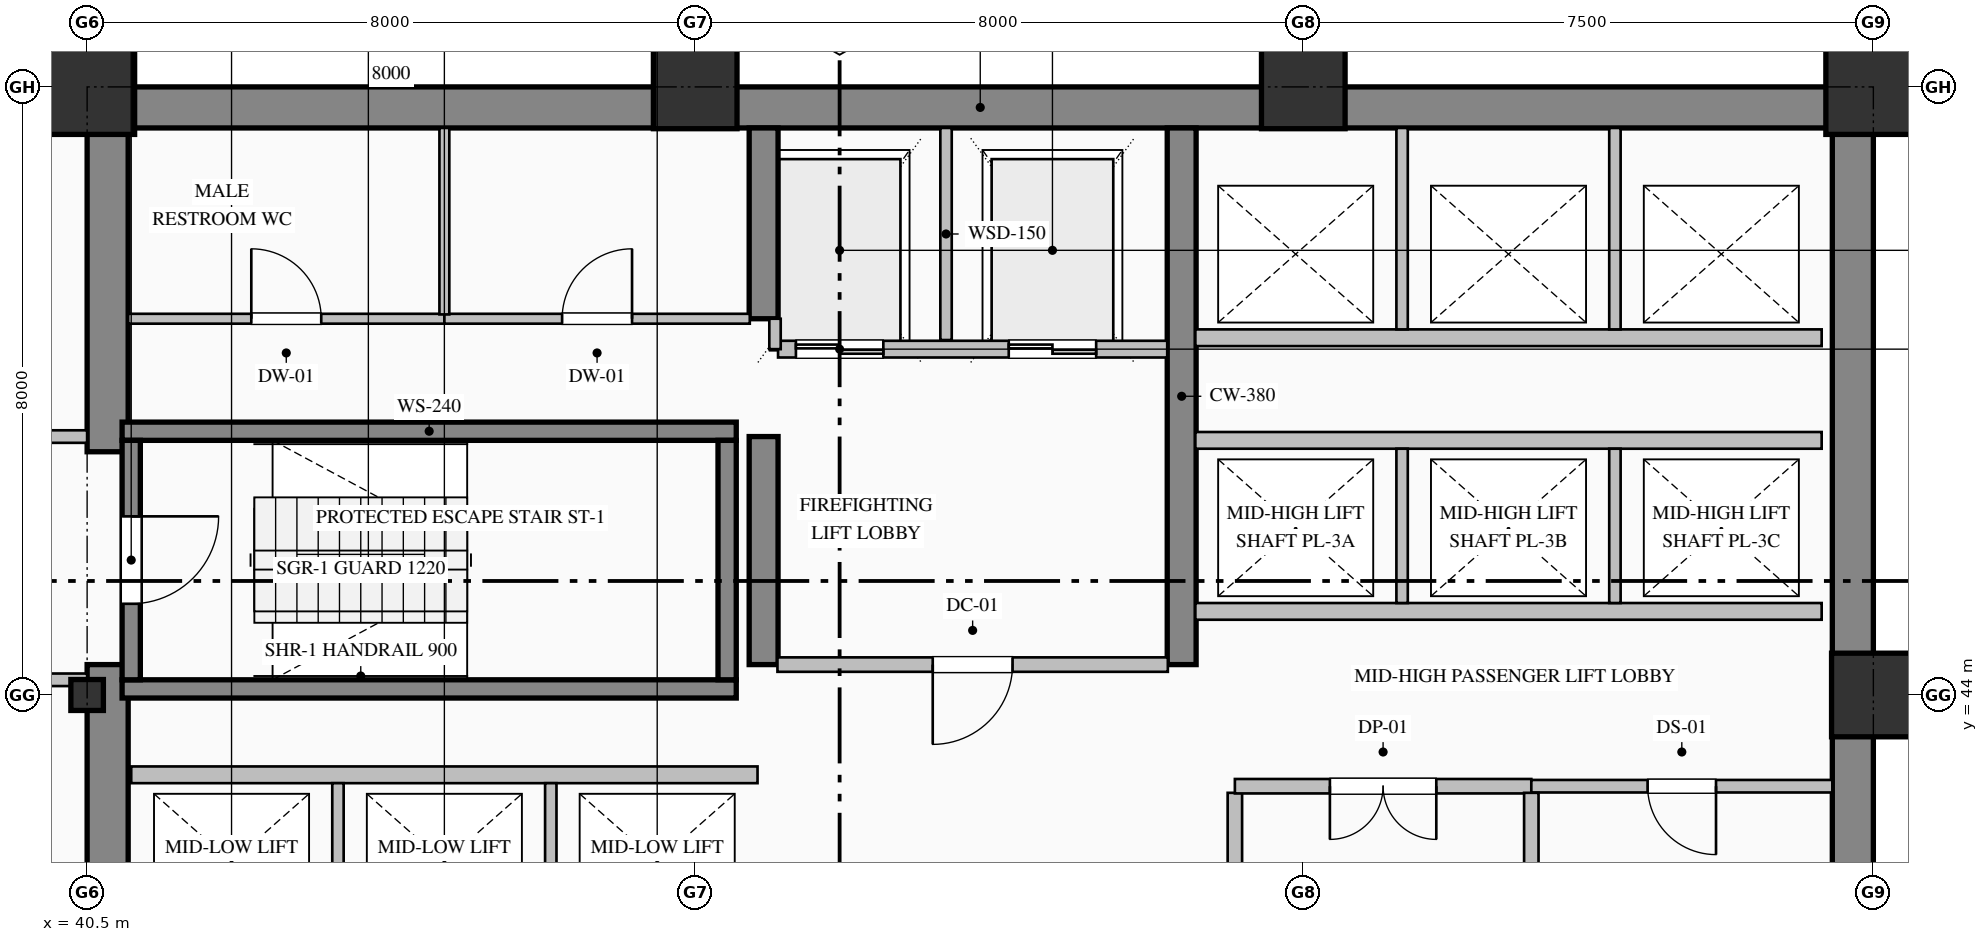
"""IFC4 building model, lengths in metres.
Left out: names, types, materials, properties, quantities, classifications, styles, units other than length and angle.
Written with IfcOpenShell. Run it as: python <this file> out.ifc"""

import sys

from ifc_helpers import new_model, si_unit, direction, frame, frame_2d, origin, origin_2d, place, context, subcontext, project, spatial, rectangle, hollow_rectangle, i_section, extrude, element, fill, save


model = new_model("IFC4")
c1 = context("Model", 3, precision=1e-05, world=origin(), true_north=direction((0.0, 1.0)))
c2 = subcontext(c1, "Body", "Model", "MODEL_VIEW")
j1 = project(units=[si_unit("LENGTHUNIT", "METRE"), si_unit("PLANEANGLEUNIT", "RADIAN")], contexts=[c1])
p1 = place(None, origin())
s1 = spatial("IfcSite", under=j1, at=p1, CompositionType="ELEMENT")
p2 = place(p1, origin())
s2 = spatial("IfcBuilding", under=s1, at=p2, CompositionType="ELEMENT")
p3 = place(p2, frame((0.0, 0.0, 84.2)))
s3 = spatial("IfcBuildingStorey", under=s2, at=p3, CompositionType="ELEMENT", Elevation=84.2)
p4 = place(p3, frame((40.5, 51.73, 0.0), z_axis=(0.0, 0.0, 1.0), x_axis=(1.0, 0.0, 0.0)))
e1 = element("IfcWall", 1, at=p4, inside=s3, PredefinedType="SHEAR", context=c2, shape_type="SweptSolid", body=[
    extrude(rectangle(XDim=23.5, YDim=0.54, at=frame_2d((11.75, 0.0))), origin(), (0.0, 0.0, 1.0), 3.75),
])
p5 = place(p3, frame((63.73, 36.32, 0.0), z_axis=(0.0, 0.0, 1.0), x_axis=(0.0, 1.0, 0.0)))
e2 = element("IfcWall", 2, at=p5, inside=s3, PredefinedType="SHEAR", context=c2, shape_type="SweptSolid", body=[
    extrude(rectangle(XDim=15.14, YDim=0.54, at=frame_2d((7.57, 0.0))), origin(), (0.0, 0.0, 1.0), 3.75),
])
p6 = place(p3, frame((40.77, 36.54, 0.0), z_axis=(0.0, 0.0, 1.0), x_axis=(0.0, 1.0, 0.0)))
e3 = element("IfcWall", 3, at=p6, inside=s3, PredefinedType="SHEAR", context=c2, shape_type="SweptSolid", body=[
    extrude(rectangle(XDim=7.86, YDim=0.54, at=frame_2d((3.93, 0.0))), origin(), (0.0, 0.0, 1.0), 3.75),
])
p7 = place(p3, frame((40.77, 47.2, 0.0), z_axis=(0.0, 0.0, 1.0), x_axis=(0.0, 1.0, 0.0)))
e4 = element("IfcWall", 4, at=p7, inside=s3, PredefinedType="SHEAR", context=c2, shape_type="SweptSolid", body=[
    extrude(rectangle(XDim=4.26, YDim=0.54, at=frame_2d((2.13, 0.0))), origin(), (0.0, 0.0, 1.0), 3.75),
])
p8 = place(p3, frame((49.4, 44.4, 0.0), z_axis=(0.0, 0.0, 1.0), x_axis=(0.0, 1.0, 0.0)))
e5 = element("IfcWall", 5, at=p8, inside=s3, PredefinedType="SHEAR", context=c2, shape_type="SweptSolid", body=[
    extrude(rectangle(XDim=3.0, YDim=0.38, at=frame_2d((1.5, 0.0))), origin(), (0.0, 0.0, 1.0), 3.75),
])
p9 = place(p3, frame((49.4, 48.95, 0.0), z_axis=(0.0, 0.0, 1.0), x_axis=(0.0, 1.0, 0.0)))
e6 = element("IfcWall", 6, at=p9, inside=s3, PredefinedType="SHEAR", context=c2, shape_type="SweptSolid", body=[
    extrude(rectangle(XDim=2.51, YDim=0.38, at=frame_2d((1.255, 0.0))), origin(), (0.0, 0.0, 1.0), 3.75),
])
p10 = place(p3, frame((54.9, 44.4, 0.0), z_axis=(0.0, 0.0, 1.0), x_axis=(0.0, 1.0, 0.0)))
e7 = element("IfcWall", 7, at=p10, inside=s3, PredefinedType="SHEAR", context=c2, shape_type="SweptSolid", body=[
    extrude(rectangle(XDim=7.06, YDim=0.38, at=frame_2d((3.53, 0.0))), origin(), (0.0, 0.0, 1.0), 3.75),
])
p11 = place(p3, frame((40.5, 44.0, 0.0), z_axis=(0.0, 0.0, 1.0), x_axis=(1.0, 0.0, 0.0)))
e8 = element("IfcColumn", 8, at=p11, inside=s3, PredefinedType="COLUMN", context=c2, shape_type="SweptSolid", body=[
    extrude(i_section(OverallWidth=0.407, OverallDepth=0.428, WebThickness=0.02, FlangeThickness=0.035, FilletRadius=0.022, at=origin_2d()), origin(), (0.0, 0.0, 1.0), 4.0),
])
p12 = place(p3, frame((40.5, 52.0, 0.0), z_axis=(0.0, 0.0, 1.0), x_axis=(1.0, 0.0, 0.0)))
e9 = element("IfcColumn", 9, at=p12, inside=s3, PredefinedType="COLUMN", context=c2, shape_type="SweptSolid", body=[
    extrude(hollow_rectangle(XDim=1.25, YDim=1.25, WallThickness=0.045, at=origin_2d()), origin(), (0.0, 0.0, 1.0), 4.0),
])
for number, where, z_axis, x_axis in (
    (10, (48.5, 52.0, 0.0), (0.0, 0.0, 1.0), (1.0, 0.0, 0.0)),
    (11, (56.5, 52.0, 0.0), (0.0, 0.0, 1.0), (1.0, 0.0, 0.0)),
    (12, (64.0, 44.0, 0.0), (0.0, 0.0, 1.0), (1.0, 0.0, 0.0)),
):
    element("IfcColumn", number, at=place(p3, frame(where, z_axis=z_axis, x_axis=x_axis)), inside=s3, PredefinedType="COLUMN", context=c2, shape_type="SweptSolid", body=[
        extrude(hollow_rectangle(XDim=1.1, YDim=1.1, WallThickness=0.04, at=origin_2d()), origin(), (0.0, 0.0, 1.0), 4.0),
    ])
p13 = place(p3, frame((64.0, 52.0, 0.0), z_axis=(0.0, 0.0, 1.0), x_axis=(1.0, 0.0, 0.0)))
e13 = element("IfcColumn", 13, at=p13, inside=s3, PredefinedType="COLUMN", context=c2, shape_type="SweptSolid", body=[
    extrude(hollow_rectangle(XDim=1.25, YDim=1.25, WallThickness=0.045, at=origin_2d()), origin(), (0.0, 0.0, 1.0), 4.0),
])
p14 = place(p3, frame((4.0, 51.82, 0.0), z_axis=(0.0, 0.0, 1.0), x_axis=(1.0, 0.0, 0.0)))
e14 = element("IfcWall", 14, at=p14, inside=s3, PredefinedType="SOLIDWALL", context=c2, shape_type="SweptSolid", body=[
    extrude(rectangle(XDim=36.52, YDim=0.36, at=frame_2d((18.26, 0.0))), origin(), (0.0, 0.0, 1.0), 3.25),
])
p15 = place(p14, frame((6.0, 0.0, 0.8)))
e15 = element("IfcOpeningElement", 15, at=p15, cuts=e14, PredefinedType="OPENING", context=c2, shape_type="SweptSolid", body=[
    extrude(rectangle(XDim=2.4, YDim=2.15, at=frame_2d((1.2, 1.075))), frame((0.0, 0.19, 0.0), z_axis=(0.0, -1.0, 0.0), x_axis=(1.0, 0.0, 0.0)), (0.0, 0.0, 1.0), 0.38),
])
p16 = place(p14, frame((24.15, 0.0, 0.85)))
e16 = element("IfcOpeningElement", 16, at=p16, cuts=e14, PredefinedType="OPENING", context=c2, shape_type="SweptSolid", body=[
    extrude(rectangle(XDim=2.1, YDim=2.05, at=frame_2d((1.05, 1.025))), frame((0.0, 0.19, 0.0), z_axis=(0.0, -1.0, 0.0), x_axis=(1.0, 0.0, 0.0)), (0.0, 0.0, 1.0), 0.38),
])
for number, where, z_axis, x_axis in (
    (17, (40.96, 47.47, 0.0), (0.0, 0.0, 1.0), (1.0, 0.0, 0.0)),
    (18, (49.04, 44.08, 0.0), (0.0, 0.0, 1.0), (-1.0, 0.0, 0.0)),
):
    element("IfcWall", number, at=place(p3, frame(where, z_axis=z_axis, x_axis=x_axis)), inside=s3, PredefinedType="SOLIDWALL", context=c2, shape_type="SweptSolid", body=[
        extrude(rectangle(XDim=8.08, YDim=0.24, at=frame_2d((4.04, 0.0))), origin(), (0.0, 0.0, 1.0), 4.0),
    ])
p17 = place(p3, frame((41.08, 47.35, 0.0), z_axis=(0.0, 0.0, 1.0), x_axis=(0.0, -1.0, 0.0)))
e19 = element("IfcWall", 19, at=p17, inside=s3, PredefinedType="SOLIDWALL", context=c2, shape_type="SweptSolid", body=[
    extrude(rectangle(XDim=3.15, YDim=0.24, at=frame_2d((1.575, 0.0))), origin(), (0.0, 0.0, 1.0), 4.0),
])
p18 = place(p17, frame((1.0, 0.0, 0.0)))
e20 = element("IfcOpeningElement", 20, at=p18, cuts=e19, PredefinedType="OPENING", context=c2, shape_type="SweptSolid", body=[
    extrude(rectangle(XDim=1.15, YDim=2.2, at=frame_2d((0.575, 1.1))), frame((0.0, 0.13, 0.0), z_axis=(0.0, -1.0, 0.0), x_axis=(1.0, 0.0, 0.0)), (0.0, 0.0, 1.0), 0.26),
])
p19 = place(p3, frame((48.92, 44.2, 0.0), z_axis=(0.0, 0.0, 1.0), x_axis=(0.0, 1.0, 0.0)))
e21 = element("IfcWall", 21, at=p19, inside=s3, PredefinedType="SOLIDWALL", context=c2, shape_type="SweptSolid", body=[
    extrude(rectangle(XDim=3.15, YDim=0.24, at=frame_2d((1.575, 0.0))), origin(), (0.0, 0.0, 1.0), 4.0),
])
p20 = place(p3, frame((54.71, 48.55, 0.0), z_axis=(0.0, 0.0, 1.0), x_axis=(-1.0, 0.0, 0.0)))
e22 = element("IfcWall", 22, at=p20, inside=s3, PredefinedType="PARTITIONING", context=c2, shape_type="SweptSolid", body=[
    extrude(rectangle(XDim=5.12, YDim=0.22, at=frame_2d((2.56, 0.0))), origin(), (0.0, 0.0, 1.0), 3.75),
])
p21 = place(p20, frame((3.735, 0.0, 0.0)))
e23 = element("IfcOpeningElement", 23, at=p21, cuts=e22, PredefinedType="OPENING", context=c2, shape_type="SweptSolid", body=[
    extrude(rectangle(XDim=1.15, YDim=2.2, at=frame_2d((0.575, 1.1))), frame((0.0, 0.12, 0.0), z_axis=(0.0, -1.0, 0.0), x_axis=(1.0, 0.0, 0.0)), (0.0, 0.0, 1.0), 0.24),
])
p22 = place(p20, frame((0.935, 0.0, 0.0)))
e24 = element("IfcOpeningElement", 24, at=p22, cuts=e22, PredefinedType="OPENING", context=c2, shape_type="SweptSolid", body=[
    extrude(rectangle(XDim=1.15, YDim=2.2, at=frame_2d((0.575, 1.1))), frame((0.0, 0.12, 0.0), z_axis=(0.0, -1.0, 0.0), x_axis=(1.0, 0.0, 0.0)), (0.0, 0.0, 1.0), 0.24),
])
p23 = place(p3, frame((51.8, 48.67, 0.0), z_axis=(0.0, 0.0, 1.0), x_axis=(0.0, 1.0, 0.0)))
e25 = element("IfcWall", 25, at=p23, inside=s3, PredefinedType="PARTITIONING", context=c2, shape_type="SweptSolid", body=[
    extrude(rectangle(XDim=2.79, YDim=0.15, at=frame_2d((1.395, 0.0))), origin(), (0.0, 0.0, 1.0), 3.75),
])
p24 = place(p3, frame((49.55, 48.55, 0.0), z_axis=(0.0, 0.0, 1.0), x_axis=(0.0, 1.0, 0.0)))
e26 = element("IfcWall", 26, at=p24, inside=s3, PredefinedType="PARTITIONING", context=c2, shape_type="SweptSolid", body=[
    extrude(rectangle(XDim=0.4, YDim=0.15, at=frame_2d((0.2, 0.0))), origin(), (0.0, 0.0, 1.0), 3.75),
])
p25 = place(p3, frame((41.08, 42.95, 0.0), z_axis=(0.0, 0.0, 1.0), x_axis=(1.0, 0.0, 0.0)))
e27 = element("IfcWall", 27, at=p25, inside=s3, PredefinedType="PARTITIONING", context=c2, shape_type="SweptSolid", body=[
    extrude(rectangle(XDim=8.24, YDim=0.22, at=frame_2d((4.12, 0.0))), origin(), (0.0, 0.0, 1.0), 3.75),
])
for number, where, z_axis, x_axis in (
    (28, (43.8, 40.76, 0.0), (0.0, 0.0, 1.0), (0.0, 1.0, 0.0)),
    (29, (46.6, 40.76, 0.0), (0.0, 0.0, 1.0), (0.0, 1.0, 0.0)),
):
    element("IfcWall", number, at=place(p3, frame(where, z_axis=z_axis, x_axis=x_axis)), inside=s3, PredefinedType="PARTITIONING", context=c2, shape_type="SweptSolid", body=[
        extrude(rectangle(XDim=2.08, YDim=0.15, at=frame_2d((1.04, 0.0))), origin(), (0.0, 0.0, 1.0), 3.75),
    ])
for number, where, z_axis, x_axis in (
    (30, (63.32, 45.1, 0.0), (0.0, 0.0, 1.0), (-1.0, 0.0, 0.0)),
    (31, (55.08, 47.35, 0.0), (0.0, 0.0, 1.0), (1.0, 0.0, 0.0)),
):
    element("IfcWall", number, at=place(p3, frame(where, z_axis=z_axis, x_axis=x_axis)), inside=s3, PredefinedType="PARTITIONING", context=c2, shape_type="SweptSolid", body=[
        extrude(rectangle(XDim=8.24, YDim=0.22, at=frame_2d((4.12, 0.0))), origin(), (0.0, 0.0, 1.0), 3.75),
    ])
for number, where, z_axis, x_axis in (
    (32, (57.8, 45.21, 0.0), (0.0, 0.0, 1.0), (0.0, 1.0, 0.0)),
    (33, (60.6, 45.21, 0.0), (0.0, 0.0, 1.0), (0.0, 1.0, 0.0)),
):
    element("IfcWall", number, at=place(p3, frame(where, z_axis=z_axis, x_axis=x_axis)), inside=s3, PredefinedType="PARTITIONING", context=c2, shape_type="SweptSolid", body=[
        extrude(rectangle(XDim=2.03, YDim=0.15, at=frame_2d((1.015, 0.0))), origin(), (0.0, 0.0, 1.0), 3.75),
    ])
p26 = place(p3, frame((63.32, 48.7, 0.0), z_axis=(0.0, 0.0, 1.0), x_axis=(-1.0, 0.0, 0.0)))
e34 = element("IfcWall", 34, at=p26, inside=s3, PredefinedType="PARTITIONING", context=c2, shape_type="SweptSolid", body=[
    extrude(rectangle(XDim=8.24, YDim=0.22, at=frame_2d((4.12, 0.0))), origin(), (0.0, 0.0, 1.0), 3.75),
])
for number, where, z_axis, x_axis in (
    (35, (57.8, 48.81, 0.0), (0.0, 0.0, 1.0), (0.0, 1.0, 0.0)),
    (36, (60.6, 48.81, 0.0), (0.0, 0.0, 1.0), (0.0, 1.0, 0.0)),
):
    element("IfcWall", number, at=place(p3, frame(where, z_axis=z_axis, x_axis=x_axis)), inside=s3, PredefinedType="PARTITIONING", context=c2, shape_type="SweptSolid", body=[
        extrude(rectangle(XDim=2.65, YDim=0.15, at=frame_2d((1.325, 0.0))), origin(), (0.0, 0.0, 1.0), 3.75),
    ])
p27 = place(p3, frame((37.8, 47.4, 0.0), z_axis=(0.0, 0.0, 1.0), x_axis=(1.0, 0.0, 0.0)))
e37 = element("IfcWall", 37, at=p27, inside=s3, PredefinedType="PARTITIONING", context=c2, shape_type="SweptSolid", body=[
    extrude(rectangle(XDim=2.7, YDim=0.165, at=frame_2d((1.35, 0.0))), origin(), (0.0, 0.0, 1.0), 3.75),
])
p28 = place(p27, frame((0.825, 0.0, 0.0)))
e38 = element("IfcOpeningElement", 38, at=p28, cuts=e37, PredefinedType="OPENING", context=c2, shape_type="SweptSolid", body=[
    extrude(rectangle(XDim=1.05, YDim=2.15, at=frame_2d((0.525, 1.075))), frame((0.0, 0.093, 0.0), z_axis=(0.0, -1.0, 0.0), x_axis=(1.0, 0.0, 0.0)), (0.0, 0.0, 1.0), 0.185),
])
p29 = place(p3, frame((40.5, 44.2, 0.0), z_axis=(0.0, 0.0, 1.0), x_axis=(-1.0, 0.0, 0.0)))
e39 = element("IfcWall", 39, at=p29, inside=s3, PredefinedType="PARTITIONING", context=c2, shape_type="SweptSolid", body=[
    extrude(rectangle(XDim=2.7, YDim=0.165, at=frame_2d((1.35, 0.0))), origin(), (0.0, 0.0, 1.0), 3.75),
])
p30 = place(p29, frame((0.825, 0.0, 0.0)))
e40 = element("IfcOpeningElement", 40, at=p30, cuts=e39, PredefinedType="OPENING", context=c2, shape_type="SweptSolid", body=[
    extrude(rectangle(XDim=1.05, YDim=2.15, at=frame_2d((0.525, 1.075))), frame((0.0, 0.093, 0.0), z_axis=(0.0, -1.0, 0.0), x_axis=(1.0, 0.0, 0.0)), (0.0, 0.0, 1.0), 0.185),
])
p31 = place(p3, frame((41.04, 48.95, 0.0), z_axis=(0.0, 0.0, 1.0), x_axis=(1.0, 0.0, 0.0)))
e41 = element("IfcWall", 41, at=p31, inside=s3, PredefinedType="PARTITIONING", context=c2, shape_type="SweptSolid", body=[
    extrude(rectangle(XDim=4.16, YDim=0.13, at=frame_2d((2.08, 0.0))), origin(), (0.0, 0.0, 1.0), 3.75),
])
p32 = place(p31, frame((1.62, 0.0, 0.0)))
e42 = element("IfcOpeningElement", 42, at=p32, cuts=e41, PredefinedType="OPENING", context=c2, shape_type="SweptSolid", body=[
    extrude(rectangle(XDim=0.92, YDim=2.15, at=frame_2d((0.46, 1.075))), frame((0.0, 0.075, 0.0), z_axis=(0.0, -1.0, 0.0), x_axis=(1.0, 0.0, 0.0)), (0.0, 0.0, 1.0), 0.15),
])
p33 = place(p3, frame((45.2, 48.95, 0.0), z_axis=(0.0, 0.0, 1.0), x_axis=(1.0, 0.0, 0.0)))
e43 = element("IfcWall", 43, at=p33, inside=s3, PredefinedType="PARTITIONING", context=c2, shape_type="SweptSolid", body=[
    extrude(rectangle(XDim=4.018, YDim=0.13, at=frame_2d((2.009, 0.0))), origin(), (0.0, 0.0, 1.0), 3.75),
])
p34 = place(p33, frame((1.549, 0.0, 0.0)))
e44 = element("IfcOpeningElement", 44, at=p34, cuts=e43, PredefinedType="OPENING", context=c2, shape_type="SweptSolid", body=[
    extrude(rectangle(XDim=0.92, YDim=2.15, at=frame_2d((0.46, 1.075))), frame((0.0, 0.075, 0.0), z_axis=(0.0, -1.0, 0.0), x_axis=(1.0, 0.0, 0.0)), (0.0, 0.0, 1.0), 0.15),
])
p35 = place(p3, frame((54.718, 44.4, 0.0), z_axis=(0.0, 0.0, 1.0), x_axis=(-1.0, 0.0, 0.0)))
e45 = element("IfcWall", 45, at=p35, inside=s3, PredefinedType="PARTITIONING", context=c2, shape_type="SweptSolid", body=[
    extrude(rectangle(XDim=5.136, YDim=0.19, at=frame_2d((2.568, 0.0))), origin(), (0.0, 0.0, 1.0), 3.75),
])
p36 = place(p35, frame((2.043, 0.0, 0.0)))
e46 = element("IfcOpeningElement", 46, at=p36, cuts=e45, PredefinedType="OPENING", context=c2, shape_type="SweptSolid", body=[
    extrude(rectangle(XDim=1.05, YDim=2.15, at=frame_2d((0.525, 1.075))), frame((0.0, 0.105, 0.0), z_axis=(0.0, -1.0, 0.0), x_axis=(1.0, 0.0, 0.0)), (0.0, 0.0, 1.0), 0.21),
])
p37 = place(p3, frame((55.6, 42.713, 0.0), z_axis=(0.0, 0.0, 1.0), x_axis=(0.0, -1.0, 0.0)))
e47 = element("IfcWall", 47, at=p37, inside=s3, PredefinedType="PARTITIONING", context=c2, shape_type="SweptSolid", body=[
    extrude(rectangle(XDim=2.731, YDim=0.19, at=frame_2d((1.365, 0.0))), origin(), (0.0, 0.0, 1.0), 3.75),
])
p38 = place(p3, frame((59.5, 42.8, 0.0), z_axis=(0.0, 0.0, 1.0), x_axis=(-1.0, 0.0, 0.0)))
e48 = element("IfcWall", 48, at=p38, inside=s3, PredefinedType="PARTITIONING", context=c2, shape_type="SweptSolid", body=[
    extrude(rectangle(XDim=3.9, YDim=0.19, at=frame_2d((1.95, 0.0))), origin(), (0.0, 0.0, 1.0), 3.75),
])
p39 = place(p38, frame((1.25, 0.0, 0.0)))
e49 = element("IfcOpeningElement", 49, at=p39, cuts=e48, PredefinedType="OPENING", context=c2, shape_type="SweptSolid", body=[
    extrude(rectangle(XDim=1.4, YDim=2.25, at=frame_2d((0.7, 1.125))), frame((0.0, 0.105, 0.0), z_axis=(0.0, -1.0, 0.0), x_axis=(1.0, 0.0, 0.0)), (0.0, 0.0, 1.0), 0.21),
])
p40 = place(p3, frame((63.46, 42.8, 0.0), z_axis=(0.0, 0.0, 1.0), x_axis=(-1.0, 0.0, 0.0)))
e50 = element("IfcWall", 50, at=p40, inside=s3, PredefinedType="PARTITIONING", context=c2, shape_type="SweptSolid", body=[
    extrude(rectangle(XDim=3.96, YDim=0.165, at=frame_2d((1.98, 0.0))), origin(), (0.0, 0.0, 1.0), 3.75),
])
p41 = place(p40, frame((1.53, 0.0, 0.0)))
e51 = element("IfcOpeningElement", 51, at=p41, cuts=e50, PredefinedType="OPENING", context=c2, shape_type="SweptSolid", body=[
    extrude(rectangle(XDim=0.9, YDim=2.15, at=frame_2d((0.45, 1.075))), frame((0.0, 0.093, 0.0), z_axis=(0.0, -1.0, 0.0), x_axis=(1.0, 0.0, 0.0)), (0.0, 0.0, 1.0), 0.185),
])
p42 = place(p3, frame((45.2, 51.46, 0.0), z_axis=(0.0, 0.0, 1.0), x_axis=(0.0, -1.0, 0.0)))
e52 = element("IfcWall", 52, at=p42, inside=s3, PredefinedType="PARTITIONING", context=c2, shape_type="SweptSolid", body=[
    extrude(rectangle(XDim=2.453, YDim=0.13, at=frame_2d((1.227, 0.0))), origin(), (0.0, 0.0, 1.0), 3.75),
])
p43 = place(p3, frame((59.5, 42.713, 0.0), z_axis=(0.0, 0.0, 1.0), x_axis=(0.0, -1.0, 0.0)))
e53 = element("IfcWall", 53, at=p43, inside=s3, PredefinedType="PARTITIONING", context=c2, shape_type="SweptSolid", body=[
    extrude(rectangle(XDim=2.731, YDim=0.19, at=frame_2d((1.365, 0.0))), origin(), (0.0, 0.0, 1.0), 3.75),
])
p44 = place(p18, origin())
e54 = element("IfcDoor", 54, at=p44, inside=s3, OperationType="SINGLE_SWING_LEFT", PredefinedType="DOOR", context=c2, shape_type="SweptSolid", body=[
    extrude(rectangle(XDim=1.15, YDim=2.2, at=frame_2d((0.575, 1.1))), frame((0.0, 0.025, 0.0), z_axis=(0.0, -1.0, 0.0), x_axis=(1.0, 0.0, 0.0)), (0.0, 0.0, 1.0), 0.05),
])
fill(e20, e54)
p45 = place(p21, origin())
e55 = element("IfcDoor", 55, at=p45, inside=s3, OperationType="DOUBLE_DOOR_SLIDING", PredefinedType="DOOR", context=c2, shape_type="SweptSolid", body=[
    extrude(rectangle(XDim=1.15, YDim=2.2, at=frame_2d((0.575, 1.1))), frame((0.0, 0.025, 0.0), z_axis=(0.0, -1.0, 0.0), x_axis=(1.0, 0.0, 0.0)), (0.0, 0.0, 1.0), 0.05),
])
fill(e23, e55)
p46 = place(p22, origin())
e56 = element("IfcDoor", 56, at=p46, inside=s3, OperationType="DOUBLE_DOOR_SLIDING", PredefinedType="DOOR", context=c2, shape_type="SweptSolid", body=[
    extrude(rectangle(XDim=1.15, YDim=2.2, at=frame_2d((0.575, 1.1))), frame((0.0, 0.025, 0.0), z_axis=(0.0, -1.0, 0.0), x_axis=(1.0, 0.0, 0.0)), (0.0, 0.0, 1.0), 0.05),
])
fill(e24, e56)
p47 = place(p36, origin())
e57 = element("IfcDoor", 57, at=p47, inside=s3, OperationType="SINGLE_SWING_RIGHT", PredefinedType="DOOR", context=c2, shape_type="SweptSolid", body=[
    extrude(rectangle(XDim=1.05, YDim=2.15, at=frame_2d((0.525, 1.075))), frame((0.0, 0.025, 0.0), z_axis=(0.0, -1.0, 0.0), x_axis=(1.0, 0.0, 0.0)), (0.0, 0.0, 1.0), 0.05),
])
fill(e46, e57)
p48 = place(p32, origin())
e58 = element("IfcDoor", 58, at=p48, inside=s3, OperationType="SINGLE_SWING_LEFT", PredefinedType="DOOR", context=c2, shape_type="SweptSolid", body=[
    extrude(rectangle(XDim=0.92, YDim=2.15, at=frame_2d((0.46, 1.075))), frame((0.0, 0.025, 0.0), z_axis=(0.0, -1.0, 0.0), x_axis=(1.0, 0.0, 0.0)), (0.0, 0.0, 1.0), 0.05),
])
fill(e42, e58)
p49 = place(p34, origin())
e59 = element("IfcDoor", 59, at=p49, inside=s3, OperationType="SINGLE_SWING_RIGHT", PredefinedType="DOOR", context=c2, shape_type="SweptSolid", body=[
    extrude(rectangle(XDim=0.92, YDim=2.15, at=frame_2d((0.46, 1.075))), frame((0.0, 0.025, 0.0), z_axis=(0.0, -1.0, 0.0), x_axis=(1.0, 0.0, 0.0)), (0.0, 0.0, 1.0), 0.05),
])
fill(e44, e59)
p50 = place(p39, origin())
e60 = element("IfcDoor", 60, at=p50, inside=s3, OperationType="DOUBLE_DOOR_SINGLE_SWING", PredefinedType="DOOR", context=c2, shape_type="SweptSolid", body=[
    extrude(rectangle(XDim=1.4, YDim=2.25, at=frame_2d((0.7, 1.125))), frame((0.0, 0.025, 0.0), z_axis=(0.0, -1.0, 0.0), x_axis=(1.0, 0.0, 0.0)), (0.0, 0.0, 1.0), 0.05),
])
fill(e49, e60)
p51 = place(p41, origin())
e61 = element("IfcDoor", 61, at=p51, inside=s3, OperationType="SINGLE_SWING_LEFT", PredefinedType="DOOR", context=c2, shape_type="SweptSolid", body=[
    extrude(rectangle(XDim=0.9, YDim=2.15, at=frame_2d((0.45, 1.075))), frame((0.0, 0.025, 0.0), z_axis=(0.0, -1.0, 0.0), x_axis=(1.0, 0.0, 0.0)), (0.0, 0.0, 1.0), 0.05),
])
fill(e51, e61)
save(model, sys.argv[1])
